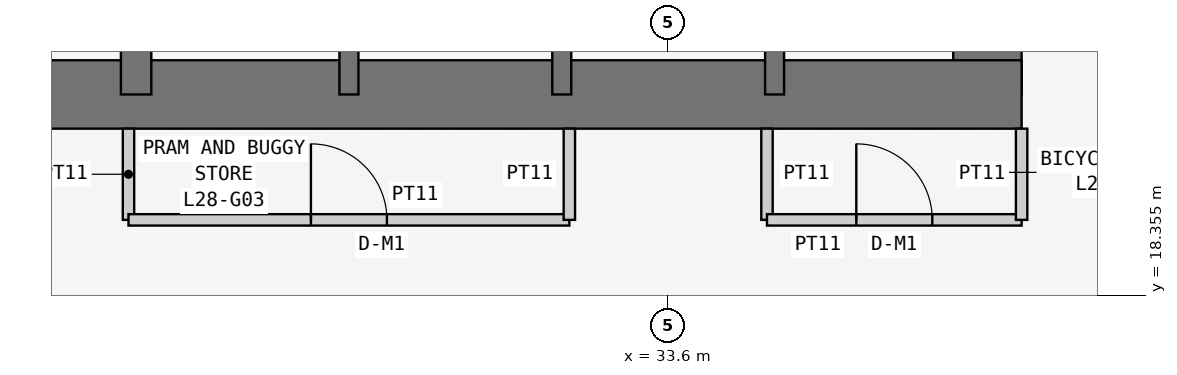
"""IFC4 building model, lengths in metres.
Left out: names, types, materials, properties, quantities, classifications, styles, units other than length and angle.
Written with IfcOpenShell. Run it as: python <this file> out.ifc"""

import sys

from ifc_helpers import new_model, si_unit, direction, frame, frame_2d, origin, place, context, subcontext, project, spatial, rectangle, extrude, element, fill, save


model = new_model("IFC4")
c1 = context("Model", 3, precision=1e-05, world=origin(), true_north=direction((0.0, 1.0)))
c2 = subcontext(c1, "Body", "Model", "MODEL_VIEW")
j1 = project(units=[si_unit("LENGTHUNIT", "METRE"), si_unit("PLANEANGLEUNIT", "RADIAN")], contexts=[c1])
p1 = place(None, origin())
s1 = spatial("IfcSite", under=j1, at=p1, CompositionType="ELEMENT")
p2 = place(p1, origin())
s2 = spatial("IfcBuilding", under=s1, at=p2, CompositionType="ELEMENT")
p3 = place(p2, frame((0.0, 0.0, 112.5)))
s3 = spatial("IfcBuildingStorey", under=s2, at=p3, CompositionType="ELEMENT", Elevation=112.5)
p4 = place(p3, frame((21.0, 21.0, 0.0), z_axis=(0.0, 0.0, 1.0), x_axis=(1.0, 0.0, 0.0)))
e1 = element("IfcWall", 1, at=p4, inside=s3, PredefinedType="SHEAR", context=c2, shape_type="SweptSolid", body=[
    extrude(rectangle(XDim=17.25, YDim=0.9, at=frame_2d((8.625, 0.0))), origin(), (0.0, 0.0, 1.0), 3.6),
])
p5 = place(p3, frame((37.8, 21.0, 0.0), z_axis=(0.0, 0.0, 1.0), x_axis=(0.0, 1.0, 0.0)))
e2 = element("IfcWall", 2, at=p5, inside=s3, PredefinedType="SHEAR", context=c2, shape_type="SweptSolid", body=[
    extrude(rectangle(XDim=17.25, YDim=0.9, at=frame_2d((8.625, 0.0))), origin(), (0.0, 0.0, 1.0), 3.6),
])
p6 = place(p5, frame((5.2, 0.0, 0.0)))
e3 = element("IfcOpeningElement", 3, at=p6, cuts=e2, PredefinedType="OPENING", context=c2, shape_type="SweptSolid", body=[
    extrude(rectangle(XDim=1.2, YDim=2.1, at=frame_2d((0.6, 1.05))), frame((0.0, 0.46, 0.0), z_axis=(0.0, -1.0, 0.0), x_axis=(1.0, 0.0, 0.0)), (0.0, 0.0, 1.0), 0.92),
])
p7 = place(p3, frame((26.6, 21.0, 0.0), z_axis=(0.0, 0.0, 1.0), x_axis=(0.0, 1.0, 0.0)))
e4 = element("IfcWall", 4, at=p7, inside=s3, PredefinedType="SHEAR", context=c2, shape_type="SweptSolid", body=[
    extrude(rectangle(XDim=16.8, YDim=0.4, at=frame_2d((8.4, 0.0))), origin(), (0.0, 0.0, 1.0), 3.6),
])
p8 = place(p7, frame((10.4, 0.0, 0.0)))
e5 = element("IfcOpeningElement", 5, at=p8, cuts=e4, PredefinedType="OPENING", context=c2, shape_type="SweptSolid", body=[
    extrude(rectangle(XDim=1.2, YDim=2.1, at=frame_2d((0.6, 1.05))), frame((0.0, 0.21, 0.0), z_axis=(0.0, -1.0, 0.0), x_axis=(1.0, 0.0, 0.0)), (0.0, 0.0, 1.0), 0.42),
])
for number, where, z_axis, x_axis in (
    (6, (29.4, 21.0, 0.0), (0.0, 0.0, 1.0), (0.0, 1.0, 0.0)),
    (7, (32.2, 21.0, 0.0), (0.0, 0.0, 1.0), (0.0, 1.0, 0.0)),
    (8, (35.0, 21.0, 0.0), (0.0, 0.0, 1.0), (0.0, 1.0, 0.0)),
):
    element("IfcWall", number, at=place(p3, frame(where, z_axis=z_axis, x_axis=x_axis)), inside=s3, PredefinedType="SHEAR", context=c2, shape_type="SweptSolid", body=[
        extrude(rectangle(XDim=3.2, YDim=0.25, at=frame_2d((1.6, 0.0))), origin(), (0.0, 0.0, 1.0), 3.6),
    ])
p9 = place(p3, frame((26.5, 20.55, 0.0), z_axis=(0.0, 0.0, 1.0), x_axis=(0.0, -1.0, 0.0)))
e9 = element("IfcWall", 9, at=p9, inside=s3, PredefinedType="PARTITIONING", context=c2, shape_type="SweptSolid", body=[
    extrude(rectangle(XDim=1.2, YDim=0.15, at=frame_2d((0.6, 0.0))), origin(), (0.0, 0.0, 1.0), 3.45),
])
p10 = place(p3, frame((26.5, 19.35, 0.0), z_axis=(0.0, 0.0, 1.0), x_axis=(1.0, 0.0, 0.0)))
e10 = element("IfcWall", 10, at=p10, inside=s3, PredefinedType="PARTITIONING", context=c2, shape_type="SweptSolid", body=[
    extrude(rectangle(XDim=5.8, YDim=0.15, at=frame_2d((2.9, 0.0))), origin(), (0.0, 0.0, 1.0), 3.45),
])
p11 = place(p10, frame((2.4, 0.0, 0.0)))
e11 = element("IfcOpeningElement", 11, at=p11, cuts=e10, PredefinedType="OPENING", context=c2, shape_type="SweptSolid", body=[
    extrude(rectangle(XDim=1.0, YDim=2.1, at=frame_2d((0.5, 1.05))), frame((0.0, 0.085, 0.0), z_axis=(0.0, -1.0, 0.0), x_axis=(1.0, 0.0, 0.0)), (0.0, 0.0, 1.0), 0.17),
])
for number, where, z_axis, x_axis in (
    (12, (32.3, 19.35, 0.0), (0.0, 0.0, 1.0), (0.0, 1.0, 0.0)),
    (13, (34.9, 20.55, 0.0), (0.0, 0.0, 1.0), (0.0, -1.0, 0.0)),
):
    element("IfcWall", number, at=place(p3, frame(where, z_axis=z_axis, x_axis=x_axis)), inside=s3, PredefinedType="PARTITIONING", context=c2, shape_type="SweptSolid", body=[
        extrude(rectangle(XDim=1.2, YDim=0.15, at=frame_2d((0.6, 0.0))), origin(), (0.0, 0.0, 1.0), 3.45),
    ])
p12 = place(p3, frame((34.9, 19.35, 0.0), z_axis=(0.0, 0.0, 1.0), x_axis=(1.0, 0.0, 0.0)))
e14 = element("IfcWall", 14, at=p12, inside=s3, PredefinedType="PARTITIONING", context=c2, shape_type="SweptSolid", body=[
    extrude(rectangle(XDim=3.35, YDim=0.15, at=frame_2d((1.675, 0.0))), origin(), (0.0, 0.0, 1.0), 3.45),
])
p13 = place(p12, frame((1.175, 0.0, 0.0)))
e15 = element("IfcOpeningElement", 15, at=p13, cuts=e14, PredefinedType="OPENING", context=c2, shape_type="SweptSolid", body=[
    extrude(rectangle(XDim=1.0, YDim=2.1, at=frame_2d((0.5, 1.05))), frame((0.0, 0.085, 0.0), z_axis=(0.0, -1.0, 0.0), x_axis=(1.0, 0.0, 0.0)), (0.0, 0.0, 1.0), 0.17),
])
p14 = place(p3, frame((38.25, 19.35, 0.0), z_axis=(0.0, 0.0, 1.0), x_axis=(0.0, 1.0, 0.0)))
e16 = element("IfcWall", 16, at=p14, inside=s3, PredefinedType="PARTITIONING", context=c2, shape_type="SweptSolid", body=[
    extrude(rectangle(XDim=1.2, YDim=0.15, at=frame_2d((0.6, 0.0))), origin(), (0.0, 0.0, 1.0), 3.45),
])
p15 = place(p11, origin())
e17 = element("IfcDoor", 17, at=p15, inside=s3, OperationType="SINGLE_SWING_LEFT", PredefinedType="DOOR", context=c2, shape_type="SweptSolid", body=[
    extrude(rectangle(XDim=1.0, YDim=2.1, at=frame_2d((0.5, 1.05))), frame((0.0, 0.025, 0.0), z_axis=(0.0, -1.0, 0.0), x_axis=(1.0, 0.0, 0.0)), (0.0, 0.0, 1.0), 0.05),
])
fill(e11, e17)
p16 = place(p13, origin())
e18 = element("IfcDoor", 18, at=p16, inside=s3, OperationType="SINGLE_SWING_LEFT", PredefinedType="DOOR", context=c2, shape_type="SweptSolid", body=[
    extrude(rectangle(XDim=1.0, YDim=2.1, at=frame_2d((0.5, 1.05))), frame((0.0, 0.025, 0.0), z_axis=(0.0, -1.0, 0.0), x_axis=(1.0, 0.0, 0.0)), (0.0, 0.0, 1.0), 0.05),
])
fill(e15, e18)
save(model, sys.argv[1])
